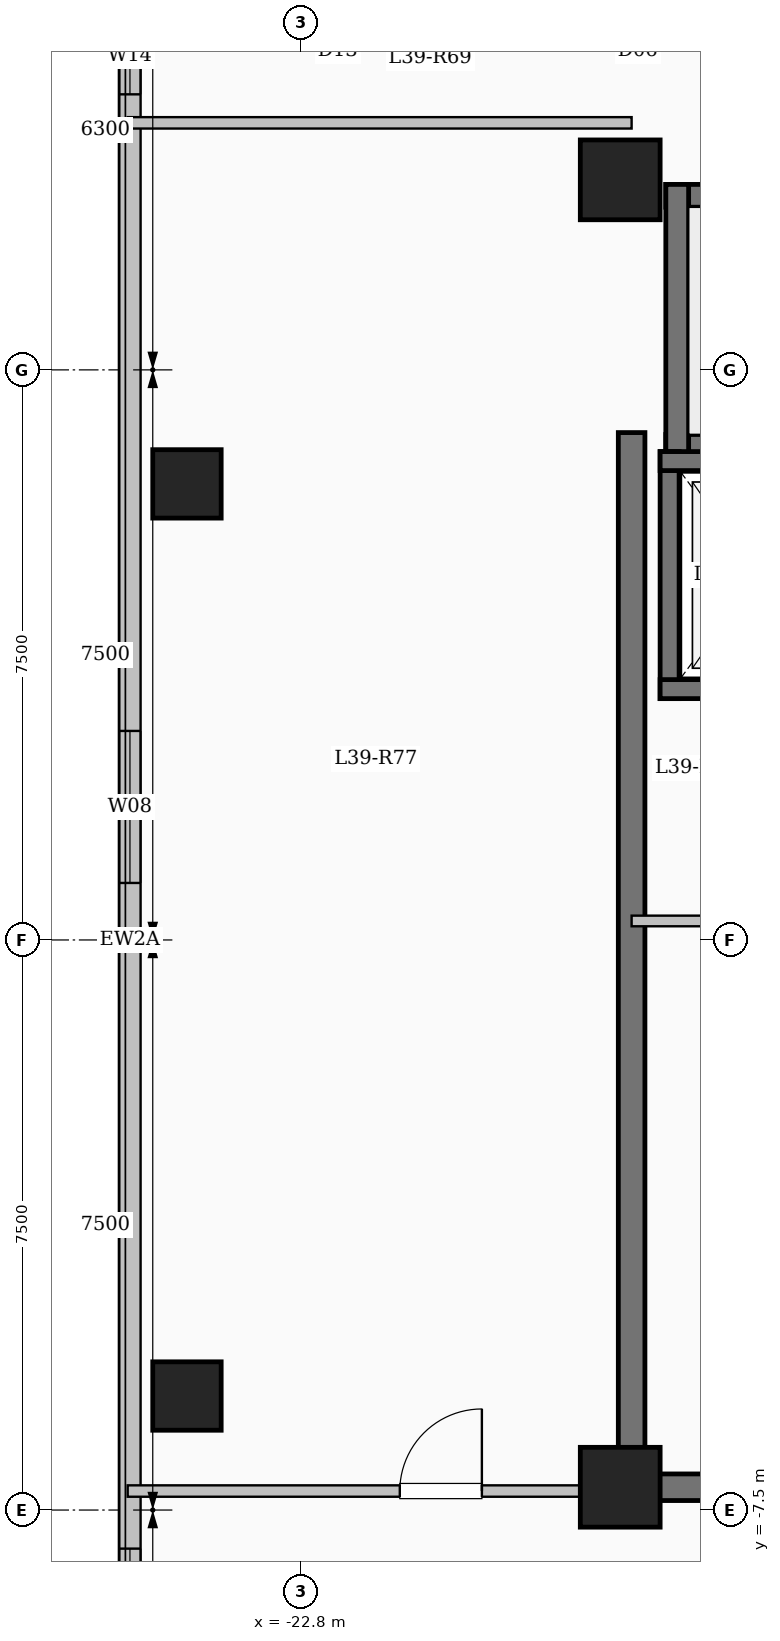
"""IFC4 building model, lengths in metres.
Left out: names, types, materials, properties, quantities, classifications, styles, units other than length and angle.
Written with IfcOpenShell. Run it as: python <this file> out.ifc"""

import sys

from ifc_helpers import new_model, si_unit, direction, frame, frame_2d, origin, origin_2d, place, context, subcontext, project, spatial, rectangle, extrude, element, fill, save


model = new_model("IFC4")
c1 = context("Model", 3, precision=1e-05, world=origin(), true_north=direction((0.0, 1.0)))
c2 = subcontext(c1, "Body", "Model", "MODEL_VIEW")
j1 = project(units=[si_unit("LENGTHUNIT", "METRE"), si_unit("PLANEANGLEUNIT", "RADIAN")], contexts=[c1])
p1 = place(None, origin())
s1 = spatial("IfcSite", under=j1, at=p1, CompositionType="ELEMENT")
p2 = place(p1, origin())
s2 = spatial("IfcBuilding", under=s1, at=p2, CompositionType="ELEMENT")
p3 = place(p2, frame((0.0, 0.0, 146.0)))
s3 = spatial("IfcBuildingStorey", under=s2, at=p3, CompositionType="ELEMENT", Elevation=146.0)
for number, where, z_axis, x_axis in (
    (1, (-18.6, -7.2, 0.0), (0.0, 0.0, 1.0), (1.0, 0.0, 0.0)),
    (2, (-18.6, 10.0, 0.0), (0.0, 0.0, 1.0), (1.0, 0.0, 0.0)),
):
    element("IfcColumn", number, at=place(p3, frame(where, z_axis=z_axis, x_axis=x_axis)), inside=s3, PredefinedType="COLUMN", context=c2, shape_type="SweptSolid", body=[
        extrude(rectangle(XDim=1.05, YDim=1.05, at=origin_2d()), origin(), (0.0, 0.0, 1.0), 3.35),
    ])
for number, where, z_axis, x_axis in (
    (3, (-24.3, -6.0, 0.0), (0.0, 0.0, 1.0), (1.0, 0.0, 0.0)),
    (4, (-24.3, 6.0, 0.0), (0.0, 0.0, 1.0), (1.0, 0.0, 0.0)),
):
    element("IfcColumn", number, at=place(p3, frame(where, z_axis=z_axis, x_axis=x_axis)), inside=s3, PredefinedType="COLUMN", context=c2, shape_type="SweptSolid", body=[
        extrude(rectangle(XDim=0.9, YDim=0.9, at=origin_2d()), origin(), (0.0, 0.0, 1.0), 3.35),
    ])
p4 = place(p3, frame((-25.05, -17.25, 0.0), z_axis=(0.0, 0.0, 1.0), x_axis=(0.0, 1.0, 0.0)))
e5 = element("IfcWall", 5, at=p4, inside=s3, PredefinedType="SOLIDWALL", context=c2, shape_type="SweptSolid", body=[
    extrude(rectangle(XDim=34.5, YDim=0.28, at=frame_2d((17.25, 0.0))), origin(), (0.0, 0.0, 1.0), 3.1),
])
p5 = place(p4, frame((2.35, 0.0, 0.9)))
e6 = element("IfcOpeningElement", 6, at=p5, cuts=e5, PredefinedType="OPENING", context=c2, shape_type="SweptSolid", body=[
    extrude(rectangle(XDim=2.2, YDim=1.75, at=frame_2d((1.1, 0.875))), frame((0.0, 0.15, 0.0), z_axis=(0.0, -1.0, 0.0), x_axis=(1.0, 0.0, 0.0)), (0.0, 0.0, 1.0), 0.3),
])
p6 = place(p4, frame((7.742, 0.0, 0.9)))
e7 = element("IfcOpeningElement", 7, at=p6, cuts=e5, PredefinedType="OPENING", context=c2, shape_type="SweptSolid", body=[
    extrude(rectangle(XDim=1.5, YDim=1.65, at=frame_2d((0.75, 0.825))), frame((0.0, 0.15, 0.0), z_axis=(0.0, -1.0, 0.0), x_axis=(1.0, 0.0, 0.0)), (0.0, 0.0, 1.0), 0.3),
])
p7 = place(p4, frame((18.0, 0.0, 0.9)))
e8 = element("IfcOpeningElement", 8, at=p7, cuts=e5, PredefinedType="OPENING", context=c2, shape_type="SweptSolid", body=[
    extrude(rectangle(XDim=2.0, YDim=1.7, at=frame_2d((1.0, 0.85))), frame((0.0, 0.15, 0.0), z_axis=(0.0, -1.0, 0.0), x_axis=(1.0, 0.0, 0.0)), (0.0, 0.0, 1.0), 0.3),
])
p8 = place(p4, frame((28.375, 0.0, 0.95)))
e9 = element("IfcOpeningElement", 9, at=p8, cuts=e5, PredefinedType="OPENING", context=c2, shape_type="SweptSolid", body=[
    extrude(rectangle(XDim=1.0, YDim=1.5, at=frame_2d((0.5, 0.75))), frame((0.0, 0.15, 0.0), z_axis=(0.0, -1.0, 0.0), x_axis=(1.0, 0.0, 0.0)), (0.0, 0.0, 1.0), 0.3),
])
p9 = place(p4, frame((31.125, 0.0, 0.9)))
e10 = element("IfcOpeningElement", 10, at=p9, cuts=e5, PredefinedType="OPENING", context=c2, shape_type="SweptSolid", body=[
    extrude(rectangle(XDim=2.0, YDim=1.7, at=frame_2d((1.0, 0.85))), frame((0.0, 0.15, 0.0), z_axis=(0.0, -1.0, 0.0), x_axis=(1.0, 0.0, 0.0)), (0.0, 0.0, 1.0), 0.3),
])
p10 = place(p3, frame((-18.0, 9.79, 0.0), z_axis=(0.0, 0.0, 1.0), x_axis=(1.0, 0.0, 0.0)))
e11 = element("IfcWall", 11, at=p10, inside=s3, PredefinedType="SHEAR", context=c2, shape_type="SweptSolid", body=[
    extrude(rectangle(XDim=8.0, YDim=0.3, at=frame_2d((4.0, 0.0))), origin(), (0.0, 0.0, 1.0), 3.35),
])
p11 = place(p3, frame((-18.0, 6.5, 0.0), z_axis=(0.0, 0.0, 1.0), x_axis=(1.0, 0.0, 0.0)))
e12 = element("IfcWall", 12, at=p11, inside=s3, PredefinedType="SHEAR", context=c2, shape_type="SweptSolid", body=[
    extrude(rectangle(XDim=8.0, YDim=0.3, at=frame_2d((4.0, 0.0))), origin(), (0.0, 0.0, 1.0), 3.35),
])
p12 = place(p11, frame((6.45, 0.0, 0.0)))
e13 = element("IfcOpeningElement", 13, at=p12, cuts=e12, PredefinedType="OPENING", context=c2, shape_type="SweptSolid", body=[
    extrude(rectangle(XDim=1.0, YDim=2.15, at=frame_2d((0.5, 1.075))), frame((0.0, 0.16, 0.0), z_axis=(0.0, -1.0, 0.0), x_axis=(1.0, 0.0, 0.0)), (0.0, 0.0, 1.0), 0.32),
])
p13 = place(p3, frame((-17.85, 6.35, 0.0), z_axis=(0.0, 0.0, 1.0), x_axis=(0.0, 1.0, 0.0)))
e14 = element("IfcWall", 14, at=p13, inside=s3, PredefinedType="SHEAR", context=c2, shape_type="SweptSolid", body=[
    extrude(rectangle(XDim=3.59, YDim=0.3, at=frame_2d((1.795, 0.0))), origin(), (0.0, 0.0, 1.0), 3.35),
])
p14 = place(p3, frame((-17.95, 3.175, 0.0), z_axis=(0.0, 0.0, 1.0), x_axis=(0.0, 1.0, 0.0)))
e15 = element("IfcWall", 15, at=p14, inside=s3, PredefinedType="SHEAR", context=c2, shape_type="SweptSolid", body=[
    extrude(rectangle(XDim=3.25, YDim=0.25, at=frame_2d((1.625, 0.0))), origin(), (0.0, 0.0, 1.0), 3.35),
])
for number, where, z_axis, x_axis in (
    (16, (-18.075, 3.3, 0.0), (0.0, 0.0, 1.0), (1.0, 0.0, 0.0)),
    (17, (-18.075, 6.3, 0.0), (0.0, 0.0, 1.0), (1.0, 0.0, 0.0)),
):
    element("IfcWall", number, at=place(p3, frame(where, z_axis=z_axis, x_axis=x_axis)), inside=s3, PredefinedType="SHEAR", context=c2, shape_type="SweptSolid", body=[
        extrude(rectangle(XDim=2.55, YDim=0.25, at=frame_2d((1.275, 0.0))), origin(), (0.0, 0.0, 1.0), 3.35),
    ])
p15 = place(p3, frame((-18.45, -7.375, 0.0), z_axis=(0.0, 0.0, 1.0), x_axis=(0.0, 1.0, 0.0)))
e18 = element("IfcWall", 18, at=p15, inside=s3, PredefinedType="SHEAR", context=c2, shape_type="SweptSolid", body=[
    extrude(rectangle(XDim=14.05, YDim=0.35, at=frame_2d((7.025, 0.0))), origin(), (0.0, 0.0, 1.0), 3.35),
])
p16 = place(p3, frame((-18.625, -7.2, 0.0), z_axis=(0.0, 0.0, 1.0), x_axis=(1.0, 0.0, 0.0)))
e19 = element("IfcWall", 19, at=p16, inside=s3, PredefinedType="SHEAR", context=c2, shape_type="SweptSolid", body=[
    extrude(rectangle(XDim=8.55, YDim=0.35, at=frame_2d((4.275, 0.0))), origin(), (0.0, 0.0, 1.0), 3.35),
])
p17 = place(p3, frame((-18.45, 0.25, 0.0), z_axis=(0.0, 0.0, 1.0), x_axis=(1.0, 0.0, 0.0)))
e20 = element("IfcWall", 20, at=p17, inside=s3, PredefinedType="PARTITIONING", context=c2, shape_type="SweptSolid", body=[
    extrude(rectangle(XDim=3.05, YDim=0.14, at=frame_2d((1.525, 0.0))), origin(), (0.0, 0.0, 1.0), 3.1),
])
p18 = place(p17, frame((1.05, 0.0, 0.0)))
e21 = element("IfcOpeningElement", 21, at=p18, cuts=e20, PredefinedType="OPENING", context=c2, shape_type="SweptSolid", body=[
    extrude(rectangle(XDim=0.9, YDim=2.08, at=frame_2d((0.45, 1.04))), frame((0.0, 0.08, 0.0), z_axis=(0.0, -1.0, 0.0), x_axis=(1.0, 0.0, 0.0)), (0.0, 0.0, 1.0), 0.16),
])
p19 = place(p3, frame((-25.08, -7.25, 0.0), z_axis=(0.0, 0.0, 1.0), x_axis=(1.0, 0.0, 0.0)))
e22 = element("IfcWall", 22, at=p19, inside=s3, PredefinedType="PARTITIONING", context=c2, shape_type="SweptSolid", body=[
    extrude(rectangle(XDim=6.63, YDim=0.15, at=frame_2d((3.315, 0.0))), origin(), (0.0, 0.0, 1.0), 3.1),
])
p20 = place(p19, frame((3.58, 0.0, 0.0)))
e23 = element("IfcOpeningElement", 23, at=p20, cuts=e22, PredefinedType="OPENING", context=c2, shape_type="SweptSolid", body=[
    extrude(rectangle(XDim=1.08, YDim=2.15, at=frame_2d((0.54, 1.075))), frame((0.0, 0.085, 0.0), z_axis=(0.0, -1.0, 0.0), x_axis=(1.0, 0.0, 0.0)), (0.0, 0.0, 1.0), 0.17),
])
p21 = place(p3, frame((-25.08, 10.75, 0.0), z_axis=(0.0, 0.0, 1.0), x_axis=(1.0, 0.0, 0.0)))
e24 = element("IfcWall", 24, at=p21, inside=s3, PredefinedType="PARTITIONING", context=c2, shape_type="SweptSolid", body=[
    extrude(rectangle(XDim=6.63, YDim=0.15, at=frame_2d((3.315, 0.0))), origin(), (0.0, 0.0, 1.0), 3.1),
])
p22 = place(p6, origin())
e25 = element("IfcWindow", 25, at=p22, inside=s3, PartitioningType="SINGLE_PANEL", PredefinedType="WINDOW", context=c2, shape_type="SweptSolid", body=[
    extrude(rectangle(XDim=1.5, YDim=1.65, at=frame_2d((0.75, 0.825))), frame((0.0, 0.03, 0.0), z_axis=(0.0, -1.0, 0.0), x_axis=(1.0, 0.0, 0.0)), (0.0, 0.0, 1.0), 0.06),
])
fill(e7, e25)
p23 = place(p7, origin())
e26 = element("IfcWindow", 26, at=p23, inside=s3, PartitioningType="SINGLE_PANEL", PredefinedType="WINDOW", context=c2, shape_type="SweptSolid", body=[
    extrude(rectangle(XDim=2.0, YDim=1.7, at=frame_2d((1.0, 0.85))), frame((0.0, 0.03, 0.0), z_axis=(0.0, -1.0, 0.0), x_axis=(1.0, 0.0, 0.0)), (0.0, 0.0, 1.0), 0.06),
])
fill(e8, e26)
p24 = place(p8, origin())
e27 = element("IfcWindow", 27, at=p24, inside=s3, PartitioningType="SINGLE_PANEL", PredefinedType="WINDOW", context=c2, shape_type="SweptSolid", body=[
    extrude(rectangle(XDim=1.0, YDim=1.5, at=frame_2d((0.5, 0.75))), frame((0.0, 0.03, 0.0), z_axis=(0.0, -1.0, 0.0), x_axis=(1.0, 0.0, 0.0)), (0.0, 0.0, 1.0), 0.06),
])
fill(e9, e27)
p25 = place(p20, origin())
e28 = element("IfcDoor", 28, at=p25, inside=s3, OperationType="SINGLE_SWING_RIGHT", PredefinedType="DOOR", context=c2, shape_type="SweptSolid", body=[
    extrude(rectangle(XDim=1.08, YDim=2.15, at=frame_2d((0.54, 1.075))), frame((0.0, 0.025, 0.0), z_axis=(0.0, -1.0, 0.0), x_axis=(1.0, 0.0, 0.0)), (0.0, 0.0, 1.0), 0.05),
])
fill(e23, e28)
save(model, sys.argv[1])
